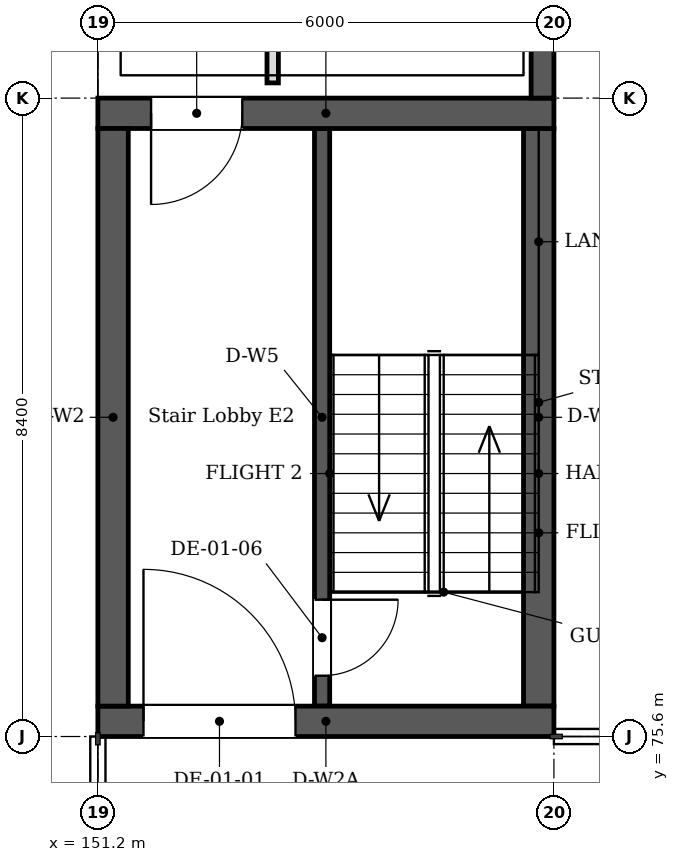
"""IFC4 building model, lengths in metres.
Left out: names, types, materials, properties, quantities, classifications, styles, units other than length and angle.
Written with IfcOpenShell. Run it as: python <this file> out.ifc"""

import sys

from ifc_helpers import new_model, si_unit, direction, frame, frame_2d, origin, place, context, subcontext, project, spatial, rectangle, extrude, element, fill, save


model = new_model("IFC4")
c1 = context("Model", 3, precision=1e-05, world=origin(), true_north=direction((0.0, 1.0)))
c2 = subcontext(c1, "Body", "Model", "MODEL_VIEW")
j1 = project(units=[si_unit("LENGTHUNIT", "METRE"), si_unit("PLANEANGLEUNIT", "RADIAN")], contexts=[c1])
p1 = place(None, origin())
s1 = spatial("IfcSite", under=j1, at=p1, CompositionType="ELEMENT")
p2 = place(p1, origin())
s2 = spatial("IfcBuilding", under=s1, at=p2, CompositionType="ELEMENT")
p3 = place(p2, frame((0.0, 0.0, 6.0)))
s3 = spatial("IfcBuildingStorey", under=s2, at=p3, CompositionType="ELEMENT", Elevation=6.0)
p4 = place(p3, frame((151.2, 75.8, 0.0), z_axis=(0.0, 0.0, 1.0), x_axis=(1.0, 0.0, 0.0)))
e1 = element("IfcWall", 1, at=p4, inside=s3, PredefinedType="SOLIDWALL", context=c2, shape_type="SweptSolid", body=[
    extrude(rectangle(XDim=6.0, YDim=0.4, at=frame_2d((3.0, 0.0))), origin(), (0.0, 0.0, 1.0), 3.92),
])
p5 = place(p4, frame((0.6, 0.0, 0.0)))
e2 = element("IfcOpeningElement", 2, at=p5, cuts=e1, PredefinedType="OPENING", context=c2, shape_type="SweptSolid", body=[
    extrude(rectangle(XDim=2.0, YDim=2.4, at=frame_2d((1.0, 1.2))), frame((0.0, 0.21, 0.0), z_axis=(0.0, -1.0, 0.0), x_axis=(1.0, 0.0, 0.0)), (0.0, 0.0, 1.0), 0.42),
])
p6 = place(p3, frame((151.2, 83.8, 0.0), z_axis=(0.0, 0.0, 1.0), x_axis=(1.0, 0.0, 0.0)))
e3 = element("IfcWall", 3, at=p6, inside=s3, PredefinedType="SOLIDWALL", context=c2, shape_type="SweptSolid", body=[
    extrude(rectangle(XDim=6.0, YDim=0.4, at=frame_2d((3.0, 0.0))), origin(), (0.0, 0.0, 1.0), 3.92),
])
p7 = place(p6, frame((0.7, 0.0, 0.0)))
e4 = element("IfcOpeningElement", 4, at=p7, cuts=e3, PredefinedType="OPENING", context=c2, shape_type="SweptSolid", body=[
    extrude(rectangle(XDim=1.2, YDim=2.1, at=frame_2d((0.6, 1.05))), frame((0.0, 0.21, 0.0), z_axis=(0.0, -1.0, 0.0), x_axis=(1.0, 0.0, 0.0)), (0.0, 0.0, 1.0), 0.42),
])
for number, where, z_axis, x_axis in (
    (5, (151.4, 76.0, 0.0), (0.0, 0.0, 1.0), (0.0, 1.0, 0.0)),
    (6, (157.0, 76.0, 0.0), (0.0, 0.0, 1.0), (0.0, 1.0, 0.0)),
):
    element("IfcWall", number, at=place(p3, frame(where, z_axis=z_axis, x_axis=x_axis)), inside=s3, PredefinedType="SOLIDWALL", context=c2, shape_type="SweptSolid", body=[
        extrude(rectangle(XDim=7.6, YDim=0.4, at=frame_2d((3.8, 0.0))), origin(), (0.0, 0.0, 1.0), 3.92),
    ])
p8 = place(p3, frame((154.15, 76.0, 0.0), z_axis=(0.0, 0.0, 1.0), x_axis=(0.0, 1.0, 0.0)))
e7 = element("IfcWall", 7, at=p8, inside=s3, PredefinedType="SOLIDWALL", context=c2, shape_type="SweptSolid", body=[
    extrude(rectangle(XDim=7.6, YDim=0.2, at=frame_2d((3.8, 0.0))), origin(), (0.0, 0.0, 1.0), 3.92),
])
p9 = place(p8, frame((0.4, 0.0, 0.0)))
e8 = element("IfcOpeningElement", 8, at=p9, cuts=e7, PredefinedType="OPENING", context=c2, shape_type="SweptSolid", body=[
    extrude(rectangle(XDim=1.0, YDim=2.1, at=frame_2d((0.5, 1.05))), frame((0.0, 0.11, 0.0), z_axis=(0.0, -1.0, 0.0), x_axis=(1.0, 0.0, 0.0)), (0.0, 0.0, 1.0), 0.22),
])
p10 = place(p3, frame((157.05, 84.0, 0.0), z_axis=(0.0, 0.0, 1.0), x_axis=(0.0, 1.0, 0.0)))
e9 = element("IfcWall", 9, at=p10, inside=s3, PredefinedType="SOLIDWALL", context=c2, shape_type="SweptSolid", body=[
    extrude(rectangle(XDim=4.0, YDim=0.3, at=frame_2d((2.0, 0.0))), origin(), (0.0, 0.0, 1.0), 3.92),
])
p11 = place(p3, frame((153.5, 84.2, 0.0), z_axis=(0.0, 0.0, 1.0), x_axis=(0.0, 1.0, 0.0)))
e10 = element("IfcWall", 10, at=p11, inside=s3, PredefinedType="PARTITIONING", context=c2, shape_type="SweptSolid", body=[
    extrude(rectangle(XDim=24.7, YDim=0.15, at=frame_2d((12.35, 0.0))), origin(), (0.0, 0.0, 1.0), 3.92),
])
p12 = place(p11, frame((5.25, 0.0, 0.0)))
e11 = element("IfcOpeningElement", 11, at=p12, cuts=e10, PredefinedType="OPENING", context=c2, shape_type="SweptSolid", body=[
    extrude(rectangle(XDim=1.1, YDim=2.4, at=frame_2d((0.55, 1.2))), frame((0.0, 0.085, 0.0), z_axis=(0.0, -1.0, 0.0), x_axis=(1.0, 0.0, 0.0)), (0.0, 0.0, 1.0), 0.17),
])
p13 = place(p11, frame((14.3, 0.0, 0.0)))
e12 = element("IfcOpeningElement", 12, at=p13, cuts=e10, PredefinedType="OPENING", context=c2, shape_type="SweptSolid", body=[
    extrude(rectangle(XDim=1.0, YDim=2.1, at=frame_2d((0.5, 1.05))), frame((0.0, 0.085, 0.0), z_axis=(0.0, -1.0, 0.0), x_axis=(1.0, 0.0, 0.0)), (0.0, 0.0, 1.0), 0.17),
])
p14 = place(p11, frame((21.0, 0.0, 0.0)))
e13 = element("IfcOpeningElement", 13, at=p14, cuts=e10, PredefinedType="OPENING", context=c2, shape_type="SweptSolid", body=[
    extrude(rectangle(XDim=1.0, YDim=2.1, at=frame_2d((0.5, 1.05))), frame((0.0, 0.085, 0.0), z_axis=(0.0, -1.0, 0.0), x_axis=(1.0, 0.0, 0.0)), (0.0, 0.0, 1.0), 0.17),
])
p15 = place(p5, origin())
e14 = element("IfcDoor", 14, at=p15, inside=s3, OperationType="DOUBLE_DOOR_SINGLE_SWING", PredefinedType="DOOR", context=c2, shape_type="SweptSolid", body=[
    extrude(rectangle(XDim=2.0, YDim=2.4, at=frame_2d((1.0, 1.2))), frame((0.0, 0.025, 0.0), z_axis=(0.0, -1.0, 0.0), x_axis=(1.0, 0.0, 0.0)), (0.0, 0.0, 1.0), 0.05),
])
fill(e2, e14)
p16 = place(p9, origin())
e15 = element("IfcDoor", 15, at=p16, inside=s3, OperationType="SINGLE_SWING_LEFT", PredefinedType="DOOR", context=c2, shape_type="SweptSolid", body=[
    extrude(rectangle(XDim=1.0, YDim=2.1, at=frame_2d((0.5, 1.05))), frame((0.0, 0.025, 0.0), z_axis=(0.0, -1.0, 0.0), x_axis=(1.0, 0.0, 0.0)), (0.0, 0.0, 1.0), 0.05),
])
fill(e8, e15)
p17 = place(p7, origin())
e16 = element("IfcDoor", 16, at=p17, inside=s3, OperationType="SINGLE_SWING_LEFT", PredefinedType="DOOR", context=c2, shape_type="SweptSolid", body=[
    extrude(rectangle(XDim=1.2, YDim=2.1, at=frame_2d((0.6, 1.05))), frame((0.0, 0.025, 0.0), z_axis=(0.0, -1.0, 0.0), x_axis=(1.0, 0.0, 0.0)), (0.0, 0.0, 1.0), 0.05),
])
fill(e4, e16)
save(model, sys.argv[1])
